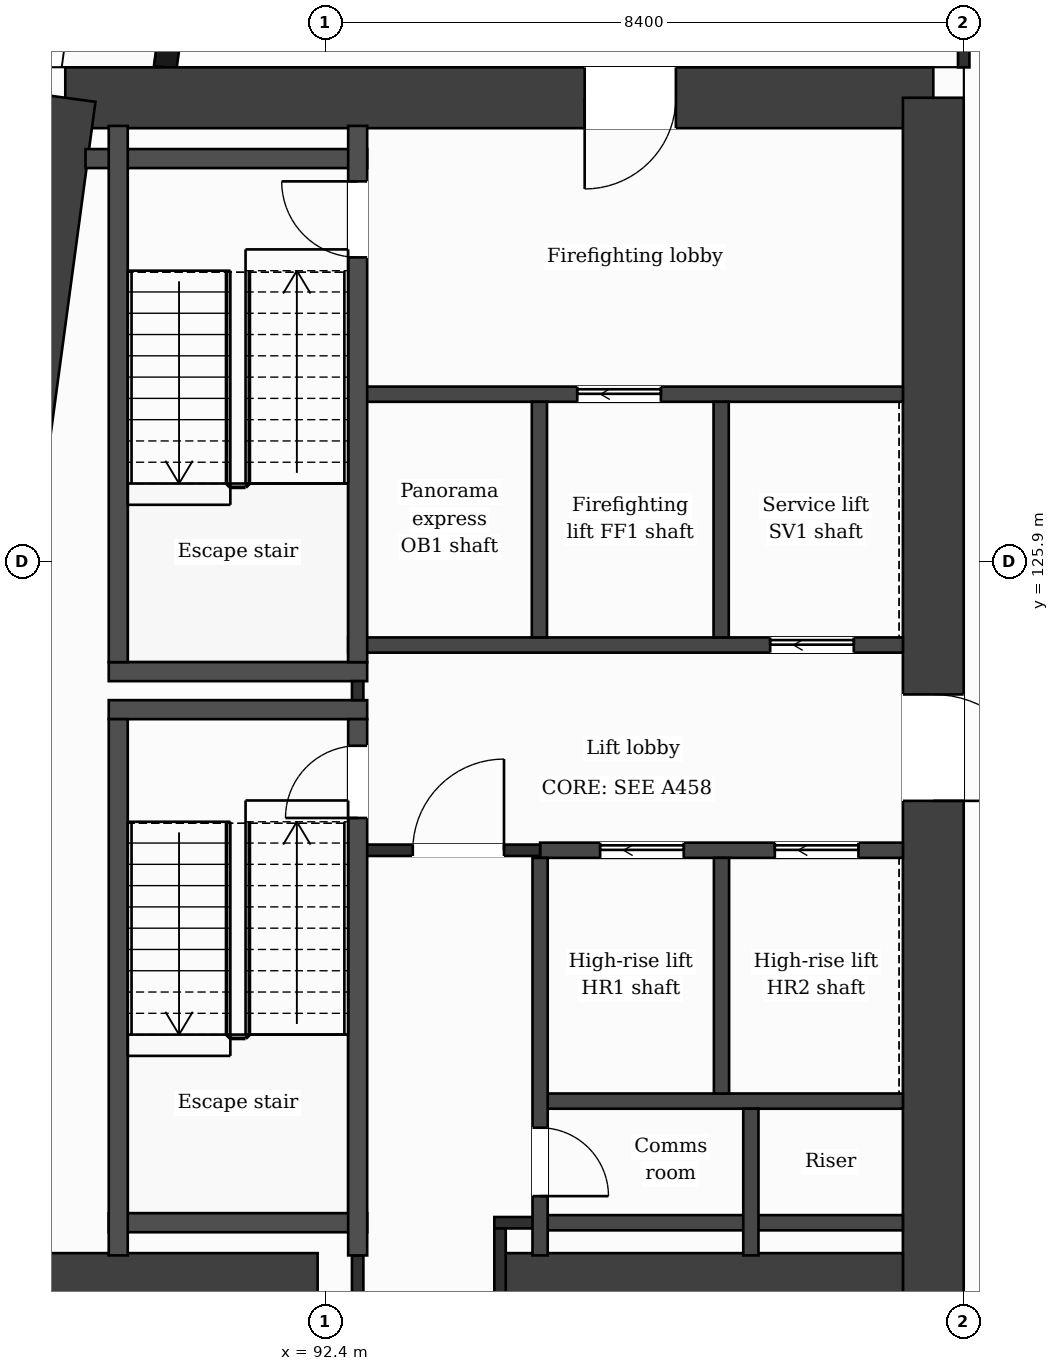
"""IFC4 building model, lengths in metres.
Left out: names, types, materials, properties, quantities, classifications, styles, units other than length and angle.
Written with IfcOpenShell. Run it as: python <this file> out.ifc"""

import sys

from ifc_helpers import new_model, si_unit, direction, frame, frame_2d, origin, place, context, subcontext, project, spatial, rectangle, extrude, element, fill, save


model = new_model("IFC4")
c1 = context("Model", 3, precision=1e-05, world=origin(), true_north=direction((0.0, 1.0)))
c2 = subcontext(c1, "Body", "Model", "MODEL_VIEW")
j1 = project(units=[si_unit("LENGTHUNIT", "METRE"), si_unit("PLANEANGLEUNIT", "RADIAN")], contexts=[c1])
p1 = place(None, origin())
s1 = spatial("IfcSite", under=j1, at=p1, CompositionType="ELEMENT")
p2 = place(p1, origin())
s2 = spatial("IfcBuilding", under=s1, at=p2, CompositionType="ELEMENT")
p3 = place(p2, frame((0.0, 0.0, 235.5)))
s3 = spatial("IfcBuildingStorey", under=s2, at=p3, CompositionType="ELEMENT", Elevation=235.5)
p4 = place(p3, frame((88.98, 132.0, 0.0), z_axis=(0.0, 0.0, 1.0), x_axis=(1.0, 0.0, 0.0)))
e1 = element("IfcWall", 1, at=p4, inside=s3, PredefinedType="SHEAR", context=c2, shape_type="SweptSolid", body=[
    extrude(rectangle(XDim=11.419, YDim=0.8, at=frame_2d((5.71, 0.0))), origin(), (0.0, 0.0, 1.0), 3.7),
])
p5 = place(p4, frame((6.833, 0.0, 0.0)))
e2 = element("IfcOpeningElement", 2, at=p5, cuts=e1, PredefinedType="OPENING", context=c2, shape_type="SweptSolid", body=[
    extrude(rectangle(XDim=1.2, YDim=2.1, at=frame_2d((0.6, 1.05))), frame((0.0, 0.41, 0.0), z_axis=(0.0, -1.0, 0.0), x_axis=(1.0, 0.0, 0.0)), (0.0, 0.0, 1.0), 0.82),
])
p6 = place(p3, frame((100.4, 132.0, 0.0), z_axis=(0.0, 0.0, 1.0), x_axis=(0.0, -1.0, 0.0)))
e3 = element("IfcWall", 3, at=p6, inside=s3, PredefinedType="SHEAR", context=c2, shape_type="SweptSolid", body=[
    extrude(rectangle(XDim=21.2, YDim=0.8, at=frame_2d((10.6, 0.0))), origin(), (0.0, 0.0, 1.0), 3.7),
])
p7 = place(p6, frame((7.85, 0.0, 0.0)))
e4 = element("IfcOpeningElement", 4, at=p7, cuts=e3, PredefinedType="OPENING", context=c2, shape_type="SweptSolid", body=[
    extrude(rectangle(XDim=1.4, YDim=2.1, at=frame_2d((0.7, 1.05))), frame((0.0, 0.41, 0.0), z_axis=(0.0, -1.0, 0.0), x_axis=(1.0, 0.0, 0.0)), (0.0, 0.0, 1.0), 0.82),
])
p8 = place(p3, frame((86.127, 110.8, 0.0), z_axis=(0.0, 0.0, 1.0), x_axis=(0.133408347329, 0.991061154956, 0.0)))
e5 = element("IfcWall", 5, at=p8, inside=s3, PredefinedType="SHEAR", context=c2, shape_type="SweptSolid", body=[
    extrude(rectangle(XDim=21.391, YDim=0.8, at=frame_2d((10.696, 0.0))), origin(), (0.0, 0.0, 1.0), 3.7),
])
p9 = place(p3, frame((87.223, 116.4, 0.0), z_axis=(0.0, 0.0, 1.0), x_axis=(1.0, 0.0, 0.0)))
e6 = element("IfcWall", 6, at=p9, inside=s3, PredefinedType="SHEAR", context=c2, shape_type="SweptSolid", body=[
    extrude(rectangle(XDim=5.077, YDim=0.8, at=frame_2d((2.539, 0.0))), origin(), (0.0, 0.0, 1.0), 3.7),
])
p10 = place(p3, frame((94.7, 116.4, 0.0), z_axis=(0.0, 0.0, 1.0), x_axis=(1.0, 0.0, 0.0)))
e7 = element("IfcWall", 7, at=p10, inside=s3, PredefinedType="SHEAR", context=c2, shape_type="SweptSolid", body=[
    extrude(rectangle(XDim=5.3, YDim=0.8, at=frame_2d((2.65, 0.0))), origin(), (0.0, 0.0, 1.0), 3.7),
])
p11 = place(p3, frame((91.177, 138.95, 0.0), z_axis=(0.0, 0.0, 1.0), x_axis=(-0.133426664613, -0.991058689065, 0.0)))
e8 = element("IfcWall", 8, at=p11, inside=s3, PredefinedType="SOLIDWALL", context=c2, shape_type="SweptSolid", body=[
    extrude(rectangle(XDim=6.609, YDim=0.3, at=frame_2d((3.305, 0.0))), origin(), (0.0, 0.0, 1.0), 3.38),
])
p12 = place(p11, frame((1.039, 0.0, 0.9)))
e9 = element("IfcOpeningElement", 9, at=p12, cuts=e8, PredefinedType="OPENING", context=c2, shape_type="SweptSolid", body=[
    extrude(rectangle(XDim=1.2, YDim=2.1, at=frame_2d((0.6, 1.05))), frame((0.0, 0.16, 0.0), z_axis=(0.0, -1.0, 0.0), x_axis=(1.0, 0.0, 0.0)), (0.0, 0.0, 1.0), 0.32),
])
p13 = place(p11, frame((4.294, 0.0, 0.0)))
e10 = element("IfcOpeningElement", 10, at=p13, cuts=e8, PredefinedType="OPENING", context=c2, shape_type="SweptSolid", body=[
    extrude(rectangle(XDim=1.2, YDim=2.4, at=frame_2d((0.6, 1.2))), frame((0.0, 0.16, 0.0), z_axis=(0.0, -1.0, 0.0), x_axis=(1.0, 0.0, 0.0)), (0.0, 0.0, 1.0), 0.32),
])
p14 = place(p3, frame((95.227, 117.2, 0.0), z_axis=(0.0, 0.0, 1.0), x_axis=(1.0, 0.0, 0.0)))
e11 = element("IfcWall", 11, at=p14, inside=s3, PredefinedType="PARTITIONING", context=c2, shape_type="SweptSolid", body=[
    extrude(rectangle(XDim=4.773, YDim=0.2, at=frame_2d((2.386, 0.0))), origin(), (0.0, 0.0, 1.0), 3.38),
])
p15 = place(p3, frame((94.625, 117.2, 0.0), z_axis=(0.0, 0.0, 1.0), x_axis=(1.0, 0.0, 0.0)))
e12 = element("IfcWall", 12, at=p15, inside=s3, PredefinedType="PARTITIONING", context=c2, shape_type="SweptSolid", body=[
    extrude(rectangle(XDim=0.602, YDim=0.15, at=frame_2d((0.301, 0.0))), origin(), (0.0, 0.0, 1.0), 3.38),
])
p16 = place(p3, frame((89.552, 117.2, 0.0), z_axis=(0.0, 0.0, 1.0), x_axis=(1.0, 0.0, 0.0)))
e13 = element("IfcWall", 13, at=p16, inside=s3, PredefinedType="PARTITIONING", context=c2, shape_type="SweptSolid", body=[
    extrude(rectangle(XDim=3.4, YDim=0.25, at=frame_2d((1.7, 0.0))), origin(), (0.0, 0.0, 1.0), 3.38),
])
p17 = place(p3, frame((95.227, 118.8, 0.0), z_axis=(0.0, 0.0, 1.0), x_axis=(1.0, 0.0, 0.0)))
e14 = element("IfcWall", 14, at=p17, inside=s3, PredefinedType="PARTITIONING", context=c2, shape_type="SweptSolid", body=[
    extrude(rectangle(XDim=4.773, YDim=0.2, at=frame_2d((2.386, 0.0))), origin(), (0.0, 0.0, 1.0), 3.38),
])
p18 = place(p3, frame((95.227, 122.1, 0.0), z_axis=(0.0, 0.0, 1.0), x_axis=(1.0, 0.0, 0.0)))
e15 = element("IfcWall", 15, at=p18, inside=s3, PredefinedType="PARTITIONING", context=c2, shape_type="SweptSolid", body=[
    extrude(rectangle(XDim=4.773, YDim=0.2, at=frame_2d((2.386, 0.0))), origin(), (0.0, 0.0, 1.0), 3.38),
])
p19 = place(p18, frame((0.79, 0.0, 0.0)))
e16 = element("IfcOpeningElement", 16, at=p19, cuts=e15, PredefinedType="OPENING", context=c2, shape_type="SweptSolid", body=[
    extrude(rectangle(XDim=1.1, YDim=2.1, at=frame_2d((0.55, 1.05))), frame((0.0, 0.11, 0.0), z_axis=(0.0, -1.0, 0.0), x_axis=(1.0, 0.0, 0.0)), (0.0, 0.0, 1.0), 0.22),
])
p20 = place(p18, frame((3.088, 0.0, 0.0)))
e17 = element("IfcOpeningElement", 17, at=p20, cuts=e15, PredefinedType="OPENING", context=c2, shape_type="SweptSolid", body=[
    extrude(rectangle(XDim=1.1, YDim=2.1, at=frame_2d((0.55, 1.05))), frame((0.0, 0.11, 0.0), z_axis=(0.0, -1.0, 0.0), x_axis=(1.0, 0.0, 0.0)), (0.0, 0.0, 1.0), 0.22),
])
p21 = place(p3, frame((92.827, 122.1, 0.0), z_axis=(0.0, 0.0, 1.0), x_axis=(1.0, 0.0, 0.0)))
e18 = element("IfcWall", 18, at=p21, inside=s3, PredefinedType="PARTITIONING", context=c2, shape_type="SweptSolid", body=[
    extrude(rectangle(XDim=2.4, YDim=0.15, at=frame_2d((1.2, 0.0))), origin(), (0.0, 0.0, 1.0), 3.38),
])
p22 = place(p21, frame((0.725, 0.0, 0.0)))
e19 = element("IfcOpeningElement", 19, at=p22, cuts=e18, PredefinedType="OPENING", context=c2, shape_type="SweptSolid", body=[
    extrude(rectangle(XDim=1.2, YDim=2.1, at=frame_2d((0.6, 1.05))), frame((0.0, 0.085, 0.0), z_axis=(0.0, -1.0, 0.0), x_axis=(1.0, 0.0, 0.0)), (0.0, 0.0, 1.0), 0.17),
])
for number, where, z_axis, x_axis in (
    (20, (89.552, 123.95, 0.0), (0.0, 0.0, 1.0), (1.0, 0.0, 0.0)),
    (21, (89.552, 124.45, 0.0), (0.0, 0.0, 1.0), (1.0, 0.0, 0.0)),
):
    element("IfcWall", number, at=place(p3, frame(where, z_axis=z_axis, x_axis=x_axis)), inside=s3, PredefinedType="PARTITIONING", context=c2, shape_type="SweptSolid", body=[
        extrude(rectangle(XDim=3.4, YDim=0.25, at=frame_2d((1.7, 0.0))), origin(), (0.0, 0.0, 1.0), 3.38),
    ])
p23 = place(p3, frame((92.702, 124.8, 0.0), z_axis=(0.0, 0.0, 1.0), x_axis=(1.0, 0.0, 0.0)))
e22 = element("IfcWall", 22, at=p23, inside=s3, PredefinedType="PARTITIONING", context=c2, shape_type="SweptSolid", body=[
    extrude(rectangle(XDim=7.298, YDim=0.2, at=frame_2d((3.649, 0.0))), origin(), (0.0, 0.0, 1.0), 3.38),
])
p24 = place(p23, frame((5.552, 0.0, 0.0)))
e23 = element("IfcOpeningElement", 23, at=p24, cuts=e22, PredefinedType="OPENING", context=c2, shape_type="SweptSolid", body=[
    extrude(rectangle(XDim=1.1, YDim=2.1, at=frame_2d((0.55, 1.05))), frame((0.0, 0.11, 0.0), z_axis=(0.0, -1.0, 0.0), x_axis=(1.0, 0.0, 0.0)), (0.0, 0.0, 1.0), 0.22),
])
p25 = place(p3, frame((92.827, 128.1, 0.0), z_axis=(0.0, 0.0, 1.0), x_axis=(1.0, 0.0, 0.0)))
e24 = element("IfcWall", 24, at=p25, inside=s3, PredefinedType="PARTITIONING", context=c2, shape_type="SweptSolid", body=[
    extrude(rectangle(XDim=7.173, YDim=0.2, at=frame_2d((3.586, 0.0))), origin(), (0.0, 0.0, 1.0), 3.38),
])
p26 = place(p25, frame((2.889, 0.0, 0.0)))
e25 = element("IfcOpeningElement", 25, at=p26, cuts=e24, PredefinedType="OPENING", context=c2, shape_type="SweptSolid", body=[
    extrude(rectangle(XDim=1.1, YDim=2.1, at=frame_2d((0.55, 1.05))), frame((0.0, 0.11, 0.0), z_axis=(0.0, -1.0, 0.0), x_axis=(1.0, 0.0, 0.0)), (0.0, 0.0, 1.0), 0.22),
])
p27 = place(p3, frame((89.246, 131.2, 0.0), z_axis=(0.0, 0.0, 1.0), x_axis=(1.0, 0.0, 0.0)))
e26 = element("IfcWall", 26, at=p27, inside=s3, PredefinedType="PARTITIONING", context=c2, shape_type="SweptSolid", body=[
    extrude(rectangle(XDim=3.706, YDim=0.25, at=frame_2d((1.853, 0.0))), origin(), (0.0, 0.0, 1.0), 3.38),
])
for number, where, z_axis, x_axis in (
    (27, (89.677, 116.77, 0.0), (0.0, 0.0, 1.0), (0.0, 1.0, 0.0)),
    (28, (89.677, 124.575, 0.0), (0.0, 0.0, 1.0), (0.0, 1.0, 0.0)),
):
    element("IfcWall", number, at=place(p3, frame(where, z_axis=z_axis, x_axis=x_axis)), inside=s3, PredefinedType="PARTITIONING", context=c2, shape_type="SweptSolid", body=[
        extrude(rectangle(XDim=7.055, YDim=0.25, at=frame_2d((3.527, 0.0))), origin(), (0.0, 0.0, 1.0), 3.38),
    ])
p28 = place(p3, frame((92.827, 116.0, 0.0), z_axis=(0.0, 0.0, 1.0), x_axis=(0.0, 1.0, 0.0)))
e29 = element("IfcWall", 29, at=p28, inside=s3, PredefinedType="PARTITIONING", context=c2, shape_type="SweptSolid", body=[
    extrude(rectangle(XDim=0.77, YDim=0.15, at=frame_2d((0.385, 0.0))), origin(), (0.0, 0.0, 1.0), 3.38),
])
p29 = place(p3, frame((92.827, 124.075, 0.0), z_axis=(0.0, 0.0, 1.0), x_axis=(0.0, 1.0, 0.0)))
e30 = element("IfcWall", 30, at=p29, inside=s3, PredefinedType="PARTITIONING", context=c2, shape_type="SweptSolid", body=[
    extrude(rectangle(XDim=0.25, YDim=0.15, at=frame_2d((0.125, 0.0))), origin(), (0.0, 0.0, 1.0), 3.38),
])
p30 = place(p3, frame((92.827, 116.77, 0.0), z_axis=(0.0, 0.0, 1.0), x_axis=(0.0, 1.0, 0.0)))
e31 = element("IfcWall", 31, at=p30, inside=s3, PredefinedType="PARTITIONING", context=c2, shape_type="SweptSolid", body=[
    extrude(rectangle(XDim=7.055, YDim=0.25, at=frame_2d((3.527, 0.0))), origin(), (0.0, 0.0, 1.0), 3.38),
])
p31 = place(p30, frame((5.755, 0.0, 0.0)))
e32 = element("IfcOpeningElement", 32, at=p31, cuts=e31, PredefinedType="OPENING", context=c2, shape_type="SweptSolid", body=[
    extrude(rectangle(XDim=0.95, YDim=2.1, at=frame_2d((0.475, 1.05))), frame((0.0, 0.135, 0.0), z_axis=(0.0, -1.0, 0.0), x_axis=(1.0, 0.0, 0.0)), (0.0, 0.0, 1.0), 0.27),
])
p32 = place(p3, frame((92.827, 124.575, 0.0), z_axis=(0.0, 0.0, 1.0), x_axis=(0.0, 1.0, 0.0)))
e33 = element("IfcWall", 33, at=p32, inside=s3, PredefinedType="PARTITIONING", context=c2, shape_type="SweptSolid", body=[
    extrude(rectangle(XDim=7.055, YDim=0.25, at=frame_2d((3.527, 0.0))), origin(), (0.0, 0.0, 1.0), 3.38),
])
p33 = place(p32, frame((5.325, 0.0, 0.0)))
e34 = element("IfcOpeningElement", 34, at=p33, cuts=e33, PredefinedType="OPENING", context=c2, shape_type="SweptSolid", body=[
    extrude(rectangle(XDim=1.0, YDim=2.1, at=frame_2d((0.5, 1.05))), frame((0.0, 0.135, 0.0), z_axis=(0.0, -1.0, 0.0), x_axis=(1.0, 0.0, 0.0)), (0.0, 0.0, 1.0), 0.27),
])
p34 = place(p3, frame((94.7, 116.0, 0.0), z_axis=(0.0, 0.0, 1.0), x_axis=(0.0, 1.0, 0.0)))
e35 = element("IfcWall", 35, at=p34, inside=s3, PredefinedType="PARTITIONING", context=c2, shape_type="SweptSolid", body=[
    extrude(rectangle(XDim=1.125, YDim=0.15, at=frame_2d((0.562, 0.0))), origin(), (0.0, 0.0, 1.0), 3.38),
])
p35 = place(p3, frame((95.218, 124.9, 0.0), z_axis=(0.0, 0.0, 1.0), x_axis=(0.0, 1.0, 0.0)))
e36 = element("IfcWall", 36, at=p35, inside=s3, PredefinedType="PARTITIONING", context=c2, shape_type="SweptSolid", body=[
    extrude(rectangle(XDim=3.1, YDim=0.2, at=frame_2d((1.55, 0.0))), origin(), (0.0, 0.0, 1.0), 3.38),
])
p36 = place(p3, frame((95.227, 116.77, 0.0), z_axis=(0.0, 0.0, 1.0), x_axis=(0.0, 1.0, 0.0)))
e37 = element("IfcWall", 37, at=p36, inside=s3, PredefinedType="PARTITIONING", context=c2, shape_type="SweptSolid", body=[
    extrude(rectangle(XDim=5.23, YDim=0.2, at=frame_2d((2.615, 0.0))), origin(), (0.0, 0.0, 1.0), 3.38),
])
p37 = place(p36, frame((0.78, 0.0, 0.0)))
e38 = element("IfcOpeningElement", 38, at=p37, cuts=e37, PredefinedType="OPENING", context=c2, shape_type="SweptSolid", body=[
    extrude(rectangle(XDim=0.9, YDim=2.1, at=frame_2d((0.45, 1.05))), frame((0.0, 0.11, 0.0), z_axis=(0.0, -1.0, 0.0), x_axis=(1.0, 0.0, 0.0)), (0.0, 0.0, 1.0), 0.22),
])
for number, where, z_axis, x_axis in (
    (39, (97.609, 124.9, 0.0), (0.0, 0.0, 1.0), (0.0, 1.0, 0.0)),
    (40, (97.614, 118.9, 0.0), (0.0, 0.0, 1.0), (0.0, 1.0, 0.0)),
):
    element("IfcWall", number, at=place(p3, frame(where, z_axis=z_axis, x_axis=x_axis)), inside=s3, PredefinedType="PARTITIONING", context=c2, shape_type="SweptSolid", body=[
        extrude(rectangle(XDim=3.1, YDim=0.2, at=frame_2d((1.55, 0.0))), origin(), (0.0, 0.0, 1.0), 3.38),
    ])
p38 = place(p3, frame((98.0, 116.77, 0.0), z_axis=(0.0, 0.0, 1.0), x_axis=(0.0, 1.0, 0.0)))
e41 = element("IfcWall", 41, at=p38, inside=s3, PredefinedType="PARTITIONING", context=c2, shape_type="SweptSolid", body=[
    extrude(rectangle(XDim=1.93, YDim=0.2, at=frame_2d((0.965, 0.0))), origin(), (0.0, 0.0, 1.0), 3.38),
])
p39 = place(p3, frame((100.8, 132.4, 0.0), z_axis=(0.0, 0.0, 1.0), x_axis=(0.0, 1.0, 0.0)))
e42 = element("IfcWall", 42, at=p39, inside=s3, PredefinedType="PARTITIONING", context=c2, shape_type="SweptSolid", body=[
    extrude(rectangle(XDim=1.325, YDim=0.15, at=frame_2d((0.663, 0.0))), origin(), (0.0, 0.0, 1.0), 3.38),
])
p40 = place(p22, origin())
e43 = element("IfcDoor", 43, at=p40, inside=s3, OperationType="SINGLE_SWING_RIGHT", PredefinedType="DOOR", context=c2, shape_type="SweptSolid", body=[
    extrude(rectangle(XDim=1.2, YDim=2.1, at=frame_2d((0.6, 1.05))), frame((0.0, 0.025, 0.0), z_axis=(0.0, -1.0, 0.0), x_axis=(1.0, 0.0, 0.0)), (0.0, 0.0, 1.0), 0.05),
])
fill(e19, e43)
p41 = place(p19, origin())
e44 = element("IfcDoor", 44, at=p41, inside=s3, OperationType="SLIDING_TO_LEFT", PredefinedType="DOOR", context=c2, shape_type="SweptSolid", body=[
    extrude(rectangle(XDim=1.1, YDim=2.1, at=frame_2d((0.55, 1.05))), frame((0.0, 0.025, 0.0), z_axis=(0.0, -1.0, 0.0), x_axis=(1.0, 0.0, 0.0)), (0.0, 0.0, 1.0), 0.05),
])
fill(e16, e44)
p42 = place(p20, origin())
e45 = element("IfcDoor", 45, at=p42, inside=s3, OperationType="SLIDING_TO_LEFT", PredefinedType="DOOR", context=c2, shape_type="SweptSolid", body=[
    extrude(rectangle(XDim=1.1, YDim=2.1, at=frame_2d((0.55, 1.05))), frame((0.0, 0.025, 0.0), z_axis=(0.0, -1.0, 0.0), x_axis=(1.0, 0.0, 0.0)), (0.0, 0.0, 1.0), 0.05),
])
fill(e17, e45)
p43 = place(p26, origin())
e46 = element("IfcDoor", 46, at=p43, inside=s3, OperationType="SLIDING_TO_LEFT", PredefinedType="DOOR", context=c2, shape_type="SweptSolid", body=[
    extrude(rectangle(XDim=1.1, YDim=2.1, at=frame_2d((0.55, 1.05))), frame((0.0, 0.025, 0.0), z_axis=(0.0, -1.0, 0.0), x_axis=(1.0, 0.0, 0.0)), (0.0, 0.0, 1.0), 0.05),
])
fill(e25, e46)
p44 = place(p24, origin())
e47 = element("IfcDoor", 47, at=p44, inside=s3, OperationType="SLIDING_TO_LEFT", PredefinedType="DOOR", context=c2, shape_type="SweptSolid", body=[
    extrude(rectangle(XDim=1.1, YDim=2.1, at=frame_2d((0.55, 1.05))), frame((0.0, 0.025, 0.0), z_axis=(0.0, -1.0, 0.0), x_axis=(1.0, 0.0, 0.0)), (0.0, 0.0, 1.0), 0.05),
])
fill(e23, e47)
p45 = place(p31, origin())
e48 = element("IfcDoor", 48, at=p45, inside=s3, OperationType="SINGLE_SWING_LEFT", PredefinedType="DOOR", context=c2, shape_type="SweptSolid", body=[
    extrude(rectangle(XDim=0.95, YDim=2.1, at=frame_2d((0.475, 1.05))), frame((0.0, 0.025, 0.0), z_axis=(0.0, -1.0, 0.0), x_axis=(1.0, 0.0, 0.0)), (0.0, 0.0, 1.0), 0.05),
])
fill(e32, e48)
p46 = place(p33, origin())
e49 = element("IfcDoor", 49, at=p46, inside=s3, OperationType="SINGLE_SWING_RIGHT", PredefinedType="DOOR", context=c2, shape_type="SweptSolid", body=[
    extrude(rectangle(XDim=1.0, YDim=2.1, at=frame_2d((0.5, 1.05))), frame((0.0, 0.025, 0.0), z_axis=(0.0, -1.0, 0.0), x_axis=(1.0, 0.0, 0.0)), (0.0, 0.0, 1.0), 0.05),
])
fill(e34, e49)
p47 = place(p37, origin())
e50 = element("IfcDoor", 50, at=p47, inside=s3, OperationType="SINGLE_SWING_LEFT", PredefinedType="DOOR", context=c2, shape_type="SweptSolid", body=[
    extrude(rectangle(XDim=0.9, YDim=2.1, at=frame_2d((0.45, 1.05))), frame((0.0, 0.025, 0.0), z_axis=(0.0, -1.0, 0.0), x_axis=(1.0, 0.0, 0.0)), (0.0, 0.0, 1.0), 0.05),
])
fill(e38, e50)
p48 = place(p5, origin())
e51 = element("IfcDoor", 51, at=p48, inside=s3, OperationType="SINGLE_SWING_LEFT", PredefinedType="DOOR", context=c2, shape_type="SweptSolid", body=[
    extrude(rectangle(XDim=1.2, YDim=2.1, at=frame_2d((0.6, 1.05))), frame((0.0, 0.025, 0.0), z_axis=(0.0, -1.0, 0.0), x_axis=(1.0, 0.0, 0.0)), (0.0, 0.0, 1.0), 0.05),
])
fill(e2, e51)
p49 = place(p7, origin())
e52 = element("IfcDoor", 52, at=p49, inside=s3, OperationType="SINGLE_SWING_RIGHT", PredefinedType="DOOR", context=c2, shape_type="SweptSolid", body=[
    extrude(rectangle(XDim=1.4, YDim=2.1, at=frame_2d((0.7, 1.05))), frame((0.0, 0.025, 0.0), z_axis=(0.0, -1.0, 0.0), x_axis=(1.0, 0.0, 0.0)), (0.0, 0.0, 1.0), 0.05),
])
fill(e4, e52)
save(model, sys.argv[1])
